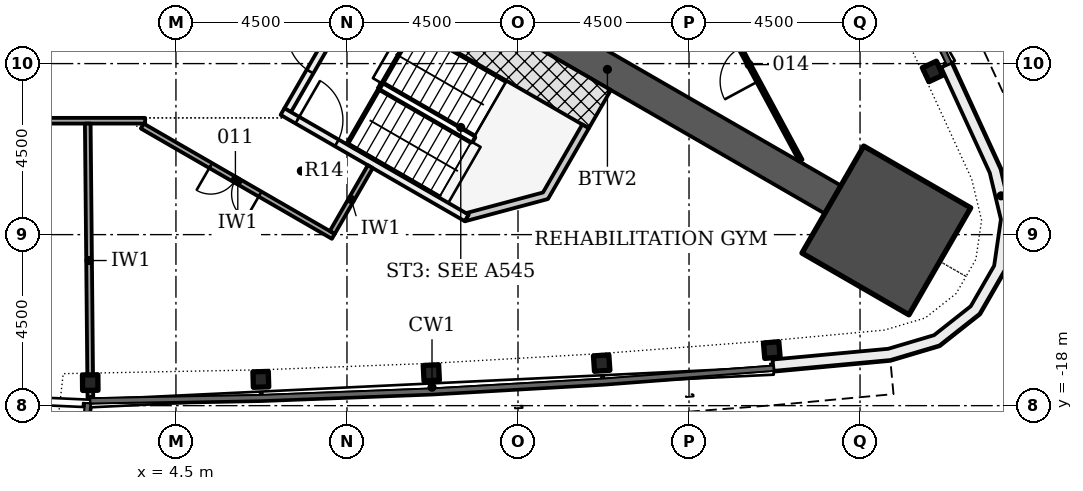
"""IFC4 building model, lengths in metres.
Left out: names, types, materials, properties, quantities, classifications, styles, units other than length and angle.
Written with IfcOpenShell. Run it as: python <this file> out.ifc"""

import sys

from ifc_helpers import new_model, si_unit, direction, frame, frame_2d, origin, origin_2d, place, context, subcontext, project, spatial, polyline, rectangle, i_section, outline, extrude, element, fill, save


model = new_model("IFC4")
c1 = context("Model", 3, precision=1e-05, world=origin(), true_north=direction((0.0, 1.0)))
c2 = subcontext(c1, "Body", "Model", "MODEL_VIEW")
j1 = project(units=[si_unit("LENGTHUNIT", "METRE"), si_unit("PLANEANGLEUNIT", "RADIAN")], contexts=[c1])
p1 = place(None, origin())
s1 = spatial("IfcSite", under=j1, at=p1, CompositionType="ELEMENT")
p2 = place(p1, origin())
s2 = spatial("IfcBuilding", under=s1, at=p2, CompositionType="ELEMENT")
p3 = place(p2, frame((0.0, 0.0, 58.2)))
s3 = spatial("IfcBuildingStorey", under=s2, at=p3, CompositionType="ELEMENT", Elevation=58.2)
p4 = place(p3, frame((9.922, -5.728, -0.2), z_axis=(0.0, 0.0, 1.0), x_axis=(0.866030067197, -0.499991922645, 0.0)))
e1 = element("IfcWall", 1, at=p4, inside=s3, PredefinedType="SHEAR", context=c2, shape_type="SweptSolid", body=[
    extrude(rectangle(XDim=13.698, YDim=0.85, at=frame_2d((6.849, 0.0))), origin(), (0.0, 0.0, 1.0), 3.6),
])
p5 = place(p3, frame((23.192, -13.39, -0.2), z_axis=(0.0, 0.0, 1.0), x_axis=(0.866025403784, -0.5, 0.0)))
e2 = element("IfcColumn", 2, at=p5, inside=s3, PredefinedType="COLUMN", context=c2, shape_type="SweptSolid", body=[
    extrude(rectangle(XDim=3.25, YDim=3.25, at=origin_2d()), origin(), (0.0, 0.0, 1.0), 3.6),
])
for number, where, z_axis, x_axis in (
    (3, (2.245, -17.394, -0.2), (0.0, 0.0, 1.0), (1.0, 0.01, 0.0)),
    (4, (6.733, -17.308, -0.2), (0.0, 0.0, 1.0), (1.0, 0.029, 0.0)),
    (5, (11.219, -17.137, -0.2), (0.0, 0.0, 1.0), (0.999, 0.048, 0.0)),
    (6, (15.702, -16.88, -0.2), (0.0, 0.0, 1.0), (0.998, 0.067, 0.0)),
    (7, (20.178, -16.537, -0.2), (0.0, 0.0, 1.0), (0.996, 0.086, 0.0)),
    (8, (24.411, -9.206, -0.2), (0.0, 0.0, 1.0), (-0.424, 0.906, 0.0)),
):
    element("IfcColumn", number, at=place(p3, frame(where, z_axis=z_axis, x_axis=x_axis)), inside=s3, PredefinedType="COLUMN", context=c2, shape_type="SweptSolid", body=[
        extrude(i_section(OverallWidth=0.404, OverallDepth=0.406, WebThickness=0.027, FlangeThickness=0.044, FilletRadius=0.015, at=origin_2d()), origin(), (0.0, 0.0, 1.0), 3.6),
    ])
p6 = place(p3, origin())
e9 = element("IfcWall", 9, at=p6, inside=s3, PredefinedType="NOTDEFINED", context=c2, shape_type="SweptSolid", body=[
    extrude(outline(polyline([(20.225, -17.085), (23.297, -16.8), (24.588, -16.417), (25.645, -15.583), (26.318, -14.417), (26.511, -13.085), (26.198, -11.776), (24.909, -8.973), (24.636, -9.098), (25.913, -11.875), (26.206, -13.099), (26.029, -14.317), (25.414, -15.384), (24.447, -16.146), (23.24, -16.504), (20.197, -16.787), (20.225, -17.085)])), origin(), (0.0, 0.0, 1.0), 3.3),
])
p7 = place(p3, frame((7.44, -10.226, -0.2), z_axis=(0.0, 0.0, 1.0), x_axis=(0.500022077904, 0.866012656725, 0.0)))
e10 = element("IfcWall", 10, at=p7, inside=s3, PredefinedType="SHEAR", context=c2, shape_type="SweptSolid", body=[
    extrude(rectangle(XDim=3.55, YDim=0.2, at=frame_2d((1.775, 0.0))), origin(), (0.0, 0.0, 1.0), 3.6),
])
p8 = place(p7, frame((1.175, 0.0, 0.2)))
e11 = element("IfcOpeningElement", 11, at=p8, cuts=e10, PredefinedType="OPENING", context=c2, shape_type="SweptSolid", body=[
    extrude(rectangle(XDim=1.2, YDim=2.1, at=frame_2d((0.6, 1.05))), frame((0.0, 0.11, 0.0), z_axis=(0.0, -1.0, 0.0), x_axis=(1.0, 0.0, 0.0)), (0.0, 0.0, 1.0), 0.22),
])
p9 = place(p3, frame((7.304, -10.262, -0.2), z_axis=(0.0, 0.0, 1.0), x_axis=(0.866026594901, -0.49999793692, 0.0)))
e12 = element("IfcWall", 12, at=p9, inside=s3, PredefinedType="SHEAR", context=c2, shape_type="SweptSolid", body=[
    extrude(rectangle(XDim=5.6, YDim=0.2, at=frame_2d((2.8, 0.0))), origin(), (0.0, 0.0, 1.0), 3.6),
])
p10 = place(p9, frame((0.45, 0.0, 0.2)))
e13 = element("IfcOpeningElement", 13, at=p10, cuts=e12, PredefinedType="OPENING", context=c2, shape_type="SweptSolid", body=[
    extrude(rectangle(XDim=1.2, YDim=2.1, at=frame_2d((0.6, 1.05))), frame((0.0, 0.11, 0.0), z_axis=(0.0, -1.0, 0.0), x_axis=(1.0, 0.0, 0.0)), (0.0, 0.0, 1.0), 0.22),
])
p11 = place(p3, frame((9.419, -6.599, -0.2), z_axis=(0.0, 0.0, 1.0), x_axis=(0.866033125095, -0.499986626058, 0.0)))
e14 = element("IfcWall", 14, at=p11, inside=s3, PredefinedType="SHEAR", context=c2, shape_type="SweptSolid", body=[
    extrude(rectangle(XDim=7.2, YDim=1.161, at=frame_2d((3.6, 0.0))), origin(), (0.0, 0.0, 1.0), 3.6),
])
p12 = place(p3, frame((0.0, 0.0, -0.2)))
e15 = element("IfcWall", 15, at=p12, inside=s3, PredefinedType="SHEAR", context=c2, shape_type="SweptSolid", body=[
    extrude(outline(polyline([(12.104, -13.149), (14.289, -12.563), (15.364, -10.701), (15.191, -10.601), (14.157, -12.392), (12.132, -12.934), (12.204, -12.976), (12.204, -12.976), (12.204, -12.976), (12.204, -12.976), (12.204, -12.976), (12.204, -12.976), (12.204, -12.976), (12.204, -12.976), (12.204, -12.976), (12.204, -12.976), (12.204, -12.976), (12.204, -12.976), (12.204, -12.976), (12.204, -12.976), (12.204, -12.976), (12.204, -12.976), (12.204, -12.976), (12.104, -13.149)])), origin(), (0.0, 0.0, 1.0), 3.6),
])
p13 = place(p3, frame((3.689, -10.503, 0.0), z_axis=(0.0, 0.0, 1.0), x_axis=(-1.0, 0.0, 0.0)))
e16 = element("IfcWall", 16, at=p13, inside=s3, PredefinedType="PARTITIONING", context=c2, shape_type="SweptSolid", body=[
    extrude(rectangle(XDim=13.068, YDim=0.15, at=frame_2d((6.534, 0.0))), origin(), (0.0, 0.0, 1.0), 2.778),
])
p14 = place(p13, frame((10.852, 0.0, 0.0)))
e17 = element("IfcOpeningElement", 17, at=p14, cuts=e16, PredefinedType="OPENING", context=c2, shape_type="SweptSolid", body=[
    extrude(rectangle(XDim=1.5, YDim=2.1, at=frame_2d((0.75, 1.05))), frame((0.0, 0.085, 0.0), z_axis=(0.0, -1.0, 0.0), x_axis=(1.0, 0.0, 0.0)), (0.0, 0.0, 1.0), 0.17),
])
p15 = place(p13, frame((5.119, 0.0, 0.0)))
e18 = element("IfcOpeningElement", 18, at=p15, cuts=e16, PredefinedType="OPENING", context=c2, shape_type="SweptSolid", body=[
    extrude(rectangle(XDim=1.5, YDim=2.1, at=frame_2d((0.75, 1.05))), frame((0.0, 0.085, 0.0), z_axis=(0.0, -1.0, 0.0), x_axis=(1.0, 0.0, 0.0)), (0.0, 0.0, 1.0), 0.17),
])
p16 = place(p3, frame((8.641, -13.546, 0.0), z_axis=(0.0, 0.0, 1.0), x_axis=(-0.866042728627, 0.499969991291, 0.0)))
e19 = element("IfcWall", 19, at=p16, inside=s3, PredefinedType="PARTITIONING", context=c2, shape_type="SweptSolid", body=[
    extrude(rectangle(XDim=5.805, YDim=0.15, at=frame_2d((2.903, 0.0))), origin(), (0.0, 0.0, 1.0), 2.778),
])
p17 = place(p16, frame((2.225, 0.0, 0.0)))
e20 = element("IfcOpeningElement", 20, at=p17, cuts=e19, PredefinedType="OPENING", context=c2, shape_type="SweptSolid", body=[
    extrude(rectangle(XDim=1.5, YDim=2.1, at=frame_2d((0.75, 1.05))), frame((0.0, 0.085, 0.0), z_axis=(0.0, -1.0, 0.0), x_axis=(1.0, 0.0, 0.0)), (0.0, 0.0, 1.0), 0.17),
])
p18 = place(p3, frame((8.614, -13.444, 0.0), z_axis=(0.0, 0.0, 1.0), x_axis=(0.499972520799, 0.866041268327, 0.0)))
e21 = element("IfcWall", 21, at=p18, inside=s3, PredefinedType="PARTITIONING", context=c2, shape_type="SweptSolid", body=[
    extrude(rectangle(XDim=2.0, YDim=0.15, at=frame_2d((1.0, 0.0))), origin(), (0.0, 0.0, 1.0), 3.4),
])
p19 = place(p3, frame((2.248, -17.784, 0.0), z_axis=(0.0, 0.0, 1.0), x_axis=(-0.009520796395, 0.999954676191, 0.0)))
e22 = element("IfcWall", 22, at=p19, inside=s3, PredefinedType="PARTITIONING", context=c2, shape_type="SweptSolid", body=[
    extrude(rectangle(XDim=7.206, YDim=0.15, at=frame_2d((3.603, 0.0))), origin(), (0.0, 0.0, 1.0), 2.778),
])
p20 = place(p3, frame((20.944, -11.552, 0.0), z_axis=(0.0, 0.0, 1.0), x_axis=(-0.475001956127, 0.879984739456, 0.0)))
e23 = element("IfcWall", 23, at=p20, inside=s3, PredefinedType="PARTITIONING", context=c2, shape_type="SweptSolid", body=[
    extrude(rectangle(XDim=9.39, YDim=0.1, at=frame_2d((4.695, 0.0))), origin(), (0.0, 0.0, 1.0), 2.778),
])
p21 = place(p20, frame((2.37, 0.0, 0.0)))
e24 = element("IfcOpeningElement", 24, at=p21, cuts=e23, PredefinedType="OPENING", context=c2, shape_type="SweptSolid", body=[
    extrude(rectangle(XDim=1.0, YDim=2.1, at=frame_2d((0.5, 1.05))), frame((0.0, 0.06, 0.0), z_axis=(0.0, -1.0, 0.0), x_axis=(1.0, 0.0, 0.0)), (0.0, 0.0, 1.0), 0.12),
])
p22 = place(p8, origin())
e25 = element("IfcDoor", 25, at=p22, inside=s3, OperationType="SINGLE_SWING_RIGHT", PredefinedType="DOOR", context=c2, shape_type="SweptSolid", body=[
    extrude(rectangle(XDim=1.2, YDim=2.1, at=frame_2d((0.6, 1.05))), frame((0.0, 0.025, 0.0), z_axis=(0.0, -1.0, 0.0), x_axis=(1.0, 0.0, 0.0)), (0.0, 0.0, 1.0), 0.05),
])
fill(e11, e25)
p23 = place(p10, origin())
e26 = element("IfcDoor", 26, at=p23, inside=s3, OperationType="SINGLE_SWING_LEFT", PredefinedType="DOOR", context=c2, shape_type="SweptSolid", body=[
    extrude(rectangle(XDim=1.2, YDim=2.1, at=frame_2d((0.6, 1.05))), frame((0.0, 0.025, 0.0), z_axis=(0.0, -1.0, 0.0), x_axis=(1.0, 0.0, 0.0)), (0.0, 0.0, 1.0), 0.05),
])
fill(e13, e26)
p24 = place(p17, origin())
e27 = element("IfcDoor", 27, at=p24, inside=s3, OperationType="DOUBLE_DOOR_SINGLE_SWING", PredefinedType="DOOR", context=c2, shape_type="SweptSolid", body=[
    extrude(rectangle(XDim=1.5, YDim=2.1, at=frame_2d((0.75, 1.05))), frame((0.0, 0.025, 0.0), z_axis=(0.0, -1.0, 0.0), x_axis=(1.0, 0.0, 0.0)), (0.0, 0.0, 1.0), 0.05),
])
fill(e20, e27)
p25 = place(p21, origin())
e28 = element("IfcDoor", 28, at=p25, inside=s3, OperationType="SINGLE_SWING_LEFT", PredefinedType="DOOR", context=c2, shape_type="SweptSolid", body=[
    extrude(rectangle(XDim=1.0, YDim=2.1, at=frame_2d((0.5, 1.05))), frame((0.0, 0.025, 0.0), z_axis=(0.0, -1.0, 0.0), x_axis=(1.0, 0.0, 0.0)), (0.0, 0.0, 1.0), 0.05),
])
fill(e24, e28)
save(model, sys.argv[1])
